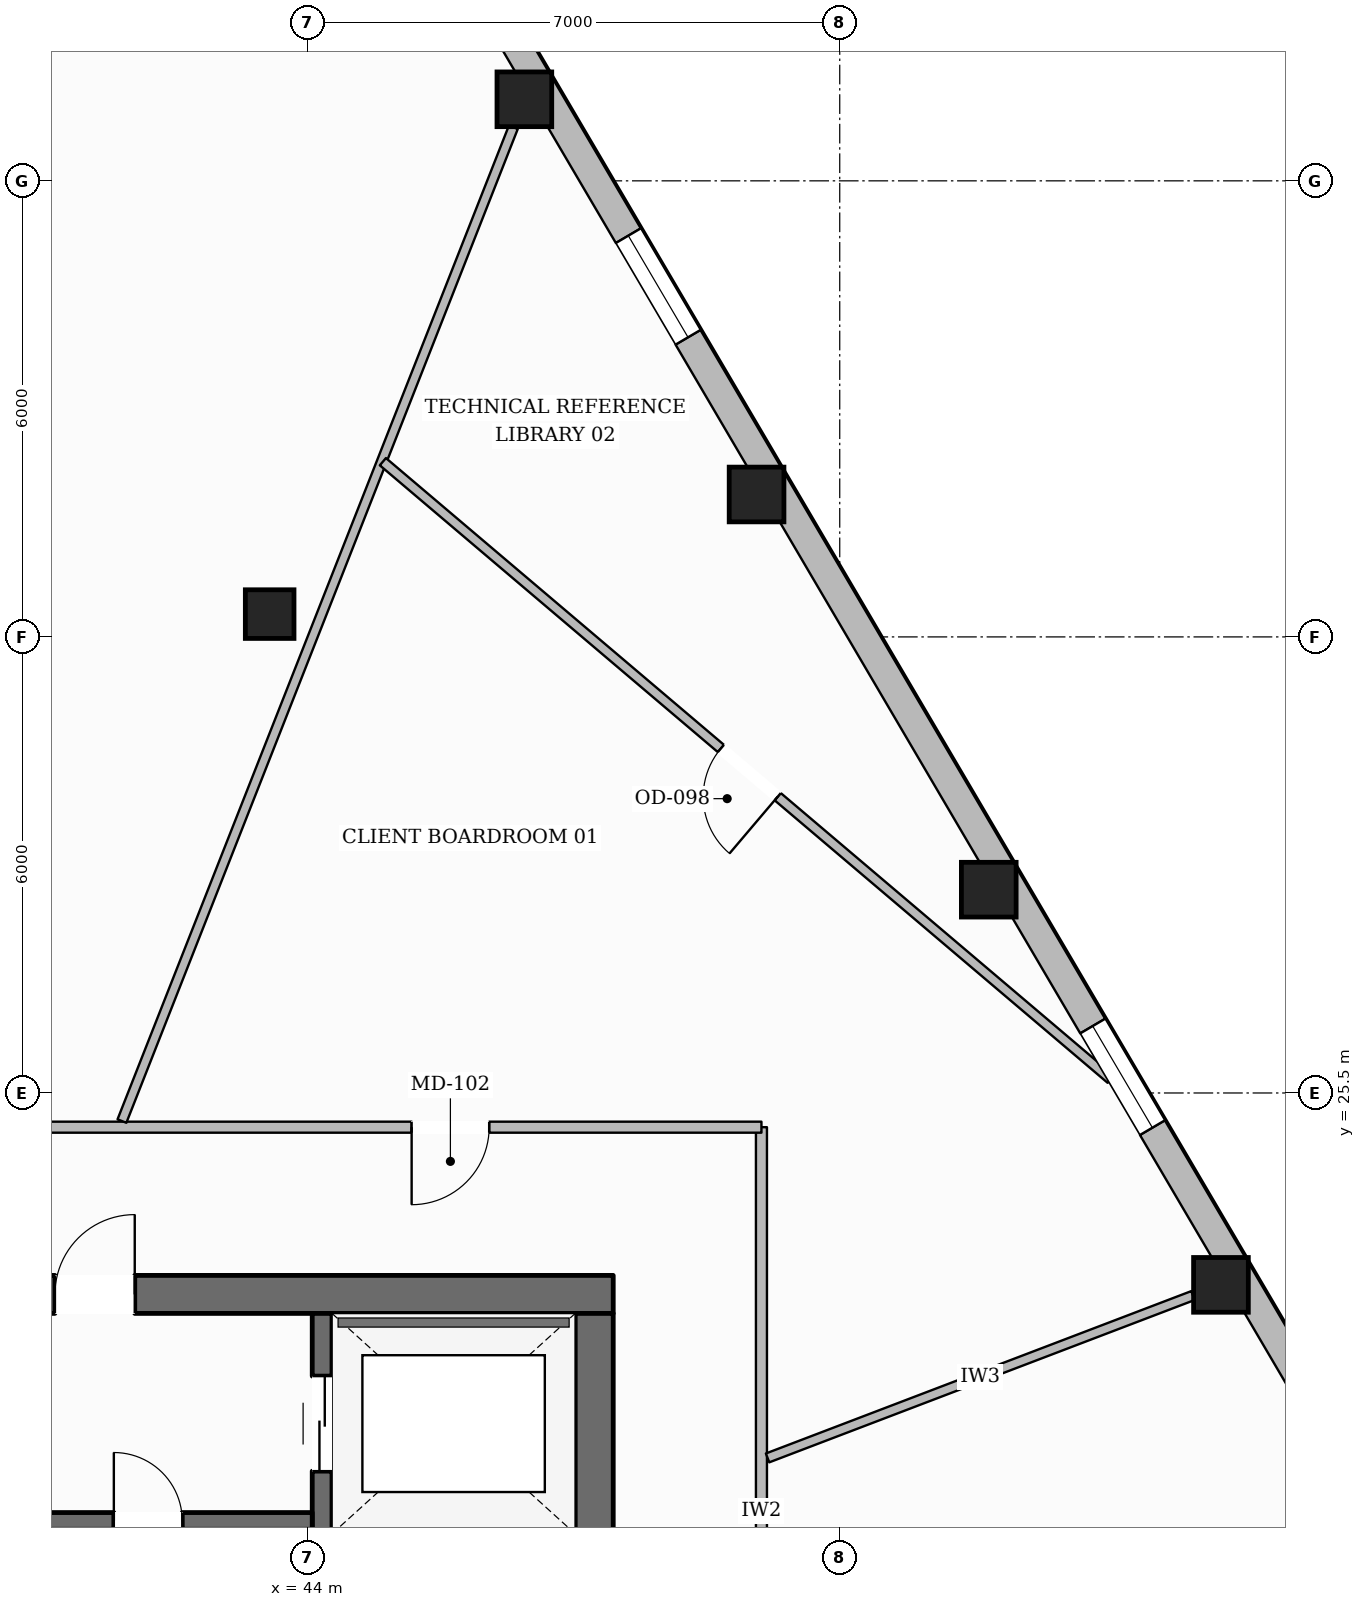
"""IFC4 building model, lengths in metres.
Left out: names, types, materials, properties, quantities, classifications, styles, units other than length and angle.
Written with IfcOpenShell. Run it as: python <this file> out.ifc"""

import sys

from ifc_helpers import new_model, si_unit, direction, frame, frame_2d, origin, origin_2d, place, context, subcontext, project, spatial, rectangle, hollow_rectangle, extrude, element, fill, save


model = new_model("IFC4")
c1 = context("Model", 3, precision=1e-05, world=origin(), true_north=direction((0.0, 1.0)))
c2 = subcontext(c1, "Body", "Model", "MODEL_VIEW")
j1 = project(units=[si_unit("LENGTHUNIT", "METRE"), si_unit("PLANEANGLEUNIT", "RADIAN")], contexts=[c1])
p1 = place(None, origin())
s1 = spatial("IfcSite", under=j1, at=p1, CompositionType="ELEMENT")
p2 = place(p1, origin())
s2 = spatial("IfcBuilding", under=s1, at=p2, CompositionType="ELEMENT")
p3 = place(p2, frame((0.0, 0.0, 127.85)))
s3 = spatial("IfcBuildingStorey", under=s2, at=p3, CompositionType="ELEMENT", Elevation=127.85)
p4 = place(p3, frame((27.98, 22.85, 0.0), z_axis=(0.0, 0.0, 1.0), x_axis=(1.0, 0.0, 0.0)))
e1 = element("IfcWall", 1, at=p4, inside=s3, PredefinedType="SOLIDWALL", context=c2, shape_type="SweptSolid", body=[
    extrude(rectangle(XDim=20.04, YDim=0.5, at=frame_2d((10.02, 0.0))), origin(), (0.0, 0.0, 1.0), 3.6),
])
p5 = place(p4, frame((6.295, 0.0, 0.0)))
e2 = element("IfcOpeningElement", 2, at=p5, cuts=e1, PredefinedType="OPENING", context=c2, shape_type="SweptSolid", body=[
    extrude(rectangle(XDim=1.05, YDim=2.15, at=frame_2d((0.525, 1.075))), frame((0.0, 0.26, 0.0), z_axis=(0.0, -1.0, 0.0), x_axis=(1.0, 0.0, 0.0)), (0.0, 0.0, 1.0), 0.52),
])
p6 = place(p4, frame((12.695, 0.0, 0.0)))
e3 = element("IfcOpeningElement", 3, at=p6, cuts=e1, PredefinedType="OPENING", context=c2, shape_type="SweptSolid", body=[
    extrude(rectangle(XDim=1.05, YDim=2.15, at=frame_2d((0.525, 1.075))), frame((0.0, 0.26, 0.0), z_axis=(0.0, -1.0, 0.0), x_axis=(1.0, 0.0, 0.0)), (0.0, 0.0, 1.0), 0.52),
])
p7 = place(p3, frame((47.77, 9.6, 0.0), z_axis=(0.0, 0.0, 1.0), x_axis=(0.0, 1.0, 0.0)))
e4 = element("IfcWall", 4, at=p7, inside=s3, PredefinedType="SOLIDWALL", context=c2, shape_type="SweptSolid", body=[
    extrude(rectangle(XDim=13.0, YDim=0.5, at=frame_2d((6.5, 0.0))), origin(), (0.0, 0.0, 1.0), 3.6),
])
p8 = place(p7, frame((0.2, 0.0, 0.0)))
e5 = element("IfcOpeningElement", 5, at=p8, cuts=e4, PredefinedType="OPENING", context=c2, shape_type="SweptSolid", body=[
    extrude(rectangle(XDim=1.1, YDim=2.15, at=frame_2d((0.55, 1.075))), frame((0.0, 0.26, 0.0), z_axis=(0.0, -1.0, 0.0), x_axis=(1.0, 0.0, 0.0)), (0.0, 0.0, 1.0), 0.52),
])
p9 = place(p7, frame((8.4, 0.0, 0.0)))
e6 = element("IfcOpeningElement", 6, at=p9, cuts=e4, PredefinedType="OPENING", context=c2, shape_type="SweptSolid", body=[
    extrude(rectangle(XDim=0.9, YDim=2.1, at=frame_2d((0.45, 1.05))), frame((0.0, 0.26, 0.0), z_axis=(0.0, -1.0, 0.0), x_axis=(1.0, 0.0, 0.0)), (0.0, 0.0, 1.0), 0.52),
])
p10 = place(p3, frame((44.19, 9.6, 0.0), z_axis=(0.0, 0.0, 1.0), x_axis=(0.0, 1.0, 0.0)))
e7 = element("IfcWall", 7, at=p10, inside=s3, PredefinedType="SHEAR", context=c2, shape_type="SweptSolid", body=[
    extrude(rectangle(XDim=13.0, YDim=0.26, at=frame_2d((6.5, 0.0))), origin(), (0.0, 0.0, 1.0), 3.6),
])
p11 = place(p10, frame((10.925, 0.0, 0.0)))
e8 = element("IfcOpeningElement", 8, at=p11, cuts=e7, PredefinedType="OPENING", context=c2, shape_type="SweptSolid", body=[
    extrude(rectangle(XDim=1.25, YDim=2.25, at=frame_2d((0.625, 1.125))), frame((0.0, 0.14, 0.0), z_axis=(0.0, -1.0, 0.0), x_axis=(1.0, 0.0, 0.0)), (0.0, 0.0, 1.0), 0.28),
])
p12 = place(p3, frame((31.94, 19.87, 0.0), z_axis=(0.0, 0.0, 1.0), x_axis=(1.0, 0.0, 0.0)))
e9 = element("IfcWall", 9, at=p12, inside=s3, PredefinedType="SOLIDWALL", context=c2, shape_type="SweptSolid", body=[
    extrude(rectangle(XDim=12.12, YDim=0.22, at=frame_2d((6.06, 0.0))), origin(), (0.0, 0.0, 1.0), 3.6),
])
p13 = place(p12, frame((6.3, 0.0, 0.0)))
e10 = element("IfcOpeningElement", 10, at=p13, cuts=e9, PredefinedType="OPENING", context=c2, shape_type="SweptSolid", body=[
    extrude(rectangle(XDim=1.1, YDim=2.15, at=frame_2d((0.55, 1.075))), frame((0.0, 0.12, 0.0), z_axis=(0.0, -1.0, 0.0), x_axis=(1.0, 0.0, 0.0)), (0.0, 0.0, 1.0), 0.24),
])
p14 = place(p12, frame((9.51, 0.0, 0.0)))
e11 = element("IfcOpeningElement", 11, at=p14, cuts=e9, PredefinedType="OPENING", context=c2, shape_type="SweptSolid", body=[
    extrude(rectangle(XDim=0.9, YDim=2.1, at=frame_2d((0.45, 1.05))), frame((0.0, 0.12, 0.0), z_axis=(0.0, -1.0, 0.0), x_axis=(1.0, 0.0, 0.0)), (0.0, 0.0, 1.0), 0.24),
])
for number, where, z_axis, x_axis in (
    (12, (56.015, 22.976, 0.0), (0.0, 0.0, 1.0), (1.0, 0.0, 0.0)),
    (13, (52.961, 28.175, 0.0), (0.0, 0.0, 1.0), (1.0, 0.0, 0.0)),
    (14, (49.906, 33.374, 0.0), (0.0, 0.0, 1.0), (1.0, 0.0, 0.0)),
    (15, (46.851, 38.573, 0.0), (0.0, 0.0, 1.0), (1.0, 0.0, 0.0)),
):
    element("IfcColumn", number, at=place(p3, frame(where, z_axis=z_axis, x_axis=x_axis)), inside=s3, PredefinedType="COLUMN", context=c2, shape_type="SweptSolid", body=[
        extrude(hollow_rectangle(XDim=0.72, YDim=0.72, WallThickness=0.032, at=origin_2d()), origin(), (0.0, 0.0, 1.0), 3.6),
    ])
p15 = place(p3, frame((43.5, 31.8, 0.0), z_axis=(0.0, 0.0, 1.0), x_axis=(1.0, 0.0, 0.0)))
e16 = element("IfcColumn", 16, at=p15, inside=s3, PredefinedType="COLUMN", context=c2, shape_type="SweptSolid", body=[
    extrude(hollow_rectangle(XDim=0.64, YDim=0.64, WallThickness=0.028, at=origin_2d()), origin(), (0.0, 0.0, 1.0), 3.6),
])
p16 = place(p3, frame((43.789, 44.317, 0.0), z_axis=(0.0, 0.0, 1.0), x_axis=(0.506589674511, -0.862187277613, 0.0)))
e17 = element("IfcWall", 17, at=p16, inside=s3, PredefinedType="STANDARD", context=c2, shape_type="SweptSolid", body=[
    extrude(rectangle(XDim=37.135, YDim=0.38, at=frame_2d((18.568, 0.0))), origin(), (0.0, 0.0, 1.0), 3.059),
])
p17 = place(p16, frame((27.252, 0.0, 0.0)))
e18 = element("IfcOpeningElement", 18, at=p17, cuts=e17, PredefinedType="OPENING", context=c2, shape_type="SweptSolid", body=[
    extrude(rectangle(XDim=1.0, YDim=2.2, at=frame_2d((0.5, 1.1))), frame((0.0, 0.2, 0.0), z_axis=(0.0, -1.0, 0.0), x_axis=(1.0, 0.0, 0.0)), (0.0, 0.0, 1.0), 0.4),
])
p18 = place(p16, frame((32.865, 0.0, 0.65)))
e19 = element("IfcOpeningElement", 19, at=p18, cuts=e17, PredefinedType="OPENING", context=c2, shape_type="SweptSolid", body=[
    extrude(rectangle(XDim=1.55, YDim=1.75, at=frame_2d((0.775, 0.875))), frame((0.0, 0.2, 0.0), z_axis=(0.0, -1.0, 0.0), x_axis=(1.0, 0.0, 0.0)), (0.0, 0.0, 1.0), 0.4),
])
p19 = place(p16, frame((20.804, 0.0, 0.65)))
e20 = element("IfcOpeningElement", 20, at=p19, cuts=e17, PredefinedType="OPENING", context=c2, shape_type="SweptSolid", body=[
    extrude(rectangle(XDim=1.55, YDim=1.75, at=frame_2d((0.775, 0.875))), frame((0.0, 0.2, 0.0), z_axis=(0.0, -1.0, 0.0), x_axis=(1.0, 0.0, 0.0)), (0.0, 0.0, 1.0), 0.4),
])
p20 = place(p16, frame((8.744, 0.0, 0.65)))
e21 = element("IfcOpeningElement", 21, at=p20, cuts=e17, PredefinedType="OPENING", context=c2, shape_type="SweptSolid", body=[
    extrude(rectangle(XDim=1.55, YDim=1.75, at=frame_2d((0.775, 0.875))), frame((0.0, 0.2, 0.0), z_axis=(0.0, -1.0, 0.0), x_axis=(1.0, 0.0, 0.0)), (0.0, 0.0, 1.0), 0.4),
])
p21 = place(p16, frame((2.714, 0.0, 0.65)))
e22 = element("IfcOpeningElement", 22, at=p21, cuts=e17, PredefinedType="OPENING", context=c2, shape_type="SweptSolid", body=[
    extrude(rectangle(XDim=1.55, YDim=1.75, at=frame_2d((0.775, 0.875))), frame((0.0, 0.2, 0.0), z_axis=(0.0, -1.0, 0.0), x_axis=(1.0, 0.0, 0.0)), (0.0, 0.0, 1.0), 0.4),
])
p22 = place(p3, frame((49.97, 7.15, 0.0), z_axis=(0.0, 0.0, 1.0), x_axis=(0.0, 1.0, 0.0)))
e23 = element("IfcWall", 23, at=p22, inside=s3, PredefinedType="PARTITIONING", context=c2, shape_type="SweptSolid", body=[
    extrude(rectangle(XDim=17.9, YDim=0.145, at=frame_2d((8.95, 0.0))), origin(), (0.0, 0.0, 1.0), 3.288),
])
p23 = place(p22, frame((6.158, 0.0, 0.0)))
e24 = element("IfcOpeningElement", 24, at=p23, cuts=e23, PredefinedType="OPENING", context=c2, shape_type="SweptSolid", body=[
    extrude(rectangle(XDim=1.4, YDim=2.2, at=frame_2d((0.7, 1.1))), frame((0.0, 0.083, 0.0), z_axis=(0.0, -1.0, 0.0), x_axis=(1.0, 0.0, 0.0)), (0.0, 0.0, 1.0), 0.165),
])
p24 = place(p3, frame((49.97, 25.05, 0.0), z_axis=(0.0, 0.0, 1.0), x_axis=(-1.0, 0.0, 0.0)))
e25 = element("IfcWall", 25, at=p24, inside=s3, PredefinedType="PARTITIONING", context=c2, shape_type="SweptSolid", body=[
    extrude(rectangle(XDim=23.94, YDim=0.145, at=frame_2d((11.97, 0.0))), origin(), (0.0, 0.0, 1.0), 3.6),
])
p25 = place(p24, frame((3.582, 0.0, 0.0)))
e26 = element("IfcOpeningElement", 26, at=p25, cuts=e25, PredefinedType="OPENING", context=c2, shape_type="SweptSolid", body=[
    extrude(rectangle(XDim=1.02, YDim=2.15, at=frame_2d((0.51, 1.075))), frame((0.0, 0.083, 0.0), z_axis=(0.0, -1.0, 0.0), x_axis=(1.0, 0.0, 0.0)), (0.0, 0.0, 1.0), 0.165),
])
p26 = place(p24, frame((12.535, 0.0, 0.0)))
e27 = element("IfcOpeningElement", 27, at=p26, cuts=e25, PredefinedType="OPENING", context=c2, shape_type="SweptSolid", body=[
    extrude(rectangle(XDim=1.4, YDim=2.2, at=frame_2d((0.7, 1.1))), frame((0.0, 0.083, 0.0), z_axis=(0.0, -1.0, 0.0), x_axis=(1.0, 0.0, 0.0)), (0.0, 0.0, 1.0), 0.165),
])
p27 = place(p3, frame((50.051, 20.699, 0.0), z_axis=(0.0, 0.0, 1.0), x_axis=(0.934275165929, 0.356552821231, 0.0)))
e28 = element("IfcWall", 28, at=p27, inside=s3, PredefinedType="PARTITIONING", context=c2, shape_type="SweptSolid", body=[
    extrude(rectangle(XDim=5.991, YDim=0.125, at=frame_2d((2.995, 0.0))), origin(), (0.0, 0.0, 1.0), 3.6),
])
p28 = place(p3, frame((41.557, 25.131, 0.0), z_axis=(0.0, 0.0, 1.0), x_axis=(0.366460710129, 0.930433526874, 0.0)))
e29 = element("IfcWall", 29, at=p28, inside=s3, PredefinedType="PARTITIONING", context=c2, shape_type="SweptSolid", body=[
    extrude(rectangle(XDim=14.052, YDim=0.125, at=frame_2d((7.026, 0.0))), origin(), (0.0, 0.0, 1.0), 3.141),
])
p29 = place(p3, frame((54.565, 25.681, 0.0), z_axis=(0.0, 0.0, 1.0), x_axis=(-0.762514657575, 0.646970939829, 0.0)))
e30 = element("IfcWall", 30, at=p29, inside=s3, PredefinedType="PARTITIONING", context=c2, shape_type="SweptSolid", body=[
    extrude(rectangle(XDim=12.557, YDim=0.125, at=frame_2d((6.279, 0.0))), origin(), (0.0, 0.0, 1.0), 3.062),
])
p30 = place(p29, frame((5.745, 0.0, 0.0)))
e31 = element("IfcOpeningElement", 31, at=p30, cuts=e30, PredefinedType="OPENING", context=c2, shape_type="SweptSolid", body=[
    extrude(rectangle(XDim=0.98, YDim=2.15, at=frame_2d((0.49, 1.075))), frame((0.0, 0.073, 0.0), z_axis=(0.0, -1.0, 0.0), x_axis=(1.0, 0.0, 0.0)), (0.0, 0.0, 1.0), 0.145),
])
p31 = place(p19, origin())
e32 = element("IfcWindow", 32, at=p31, inside=s3, PartitioningType="SINGLE_PANEL", PredefinedType="WINDOW", context=c2, shape_type="SweptSolid", body=[
    extrude(rectangle(XDim=1.55, YDim=1.75, at=frame_2d((0.775, 0.875))), frame((0.0, 0.03, 0.0), z_axis=(0.0, -1.0, 0.0), x_axis=(1.0, 0.0, 0.0)), (0.0, 0.0, 1.0), 0.06),
])
fill(e20, e32)
p32 = place(p20, origin())
e33 = element("IfcWindow", 33, at=p32, inside=s3, PartitioningType="SINGLE_PANEL", PredefinedType="WINDOW", context=c2, shape_type="SweptSolid", body=[
    extrude(rectangle(XDim=1.55, YDim=1.75, at=frame_2d((0.775, 0.875))), frame((0.0, 0.03, 0.0), z_axis=(0.0, -1.0, 0.0), x_axis=(1.0, 0.0, 0.0)), (0.0, 0.0, 1.0), 0.06),
])
fill(e21, e33)
p33 = place(p6, origin())
e34 = element("IfcDoor", 34, at=p33, inside=s3, OperationType="SINGLE_SWING_RIGHT", PredefinedType="DOOR", context=c2, shape_type="SweptSolid", body=[
    extrude(rectangle(XDim=1.05, YDim=2.15, at=frame_2d((0.525, 1.075))), frame((0.0, 0.025, 0.0), z_axis=(0.0, -1.0, 0.0), x_axis=(1.0, 0.0, 0.0)), (0.0, 0.0, 1.0), 0.05),
])
fill(e3, e34)
p34 = place(p11, origin())
e35 = element("IfcDoor", 35, at=p34, inside=s3, OperationType="DOUBLE_DOOR_SLIDING", PredefinedType="DOOR", context=c2, shape_type="SweptSolid", body=[
    extrude(rectangle(XDim=1.25, YDim=2.25, at=frame_2d((0.625, 1.125))), frame((0.0, 0.025, 0.0), z_axis=(0.0, -1.0, 0.0), x_axis=(1.0, 0.0, 0.0)), (0.0, 0.0, 1.0), 0.05),
])
fill(e8, e35)
p35 = place(p14, origin())
e36 = element("IfcDoor", 36, at=p35, inside=s3, OperationType="SINGLE_SWING_LEFT", PredefinedType="DOOR", context=c2, shape_type="SweptSolid", body=[
    extrude(rectangle(XDim=0.9, YDim=2.1, at=frame_2d((0.45, 1.05))), frame((0.0, 0.025, 0.0), z_axis=(0.0, -1.0, 0.0), x_axis=(1.0, 0.0, 0.0)), (0.0, 0.0, 1.0), 0.05),
])
fill(e11, e36)
p36 = place(p25, origin())
e37 = element("IfcDoor", 37, at=p36, inside=s3, OperationType="SINGLE_SWING_RIGHT", PredefinedType="DOOR", context=c2, shape_type="SweptSolid", body=[
    extrude(rectangle(XDim=1.02, YDim=2.15, at=frame_2d((0.51, 1.075))), frame((0.0, 0.025, 0.0), z_axis=(0.0, -1.0, 0.0), x_axis=(1.0, 0.0, 0.0)), (0.0, 0.0, 1.0), 0.05),
])
fill(e26, e37)
p37 = place(p30, origin())
e38 = element("IfcDoor", 38, at=p37, inside=s3, OperationType="SINGLE_SWING_LEFT", PredefinedType="DOOR", context=c2, shape_type="SweptSolid", body=[
    extrude(rectangle(XDim=0.98, YDim=2.15, at=frame_2d((0.49, 1.075))), frame((0.0, 0.025, 0.0), z_axis=(0.0, -1.0, 0.0), x_axis=(1.0, 0.0, 0.0)), (0.0, 0.0, 1.0), 0.05),
])
fill(e31, e38)
save(model, sys.argv[1])
